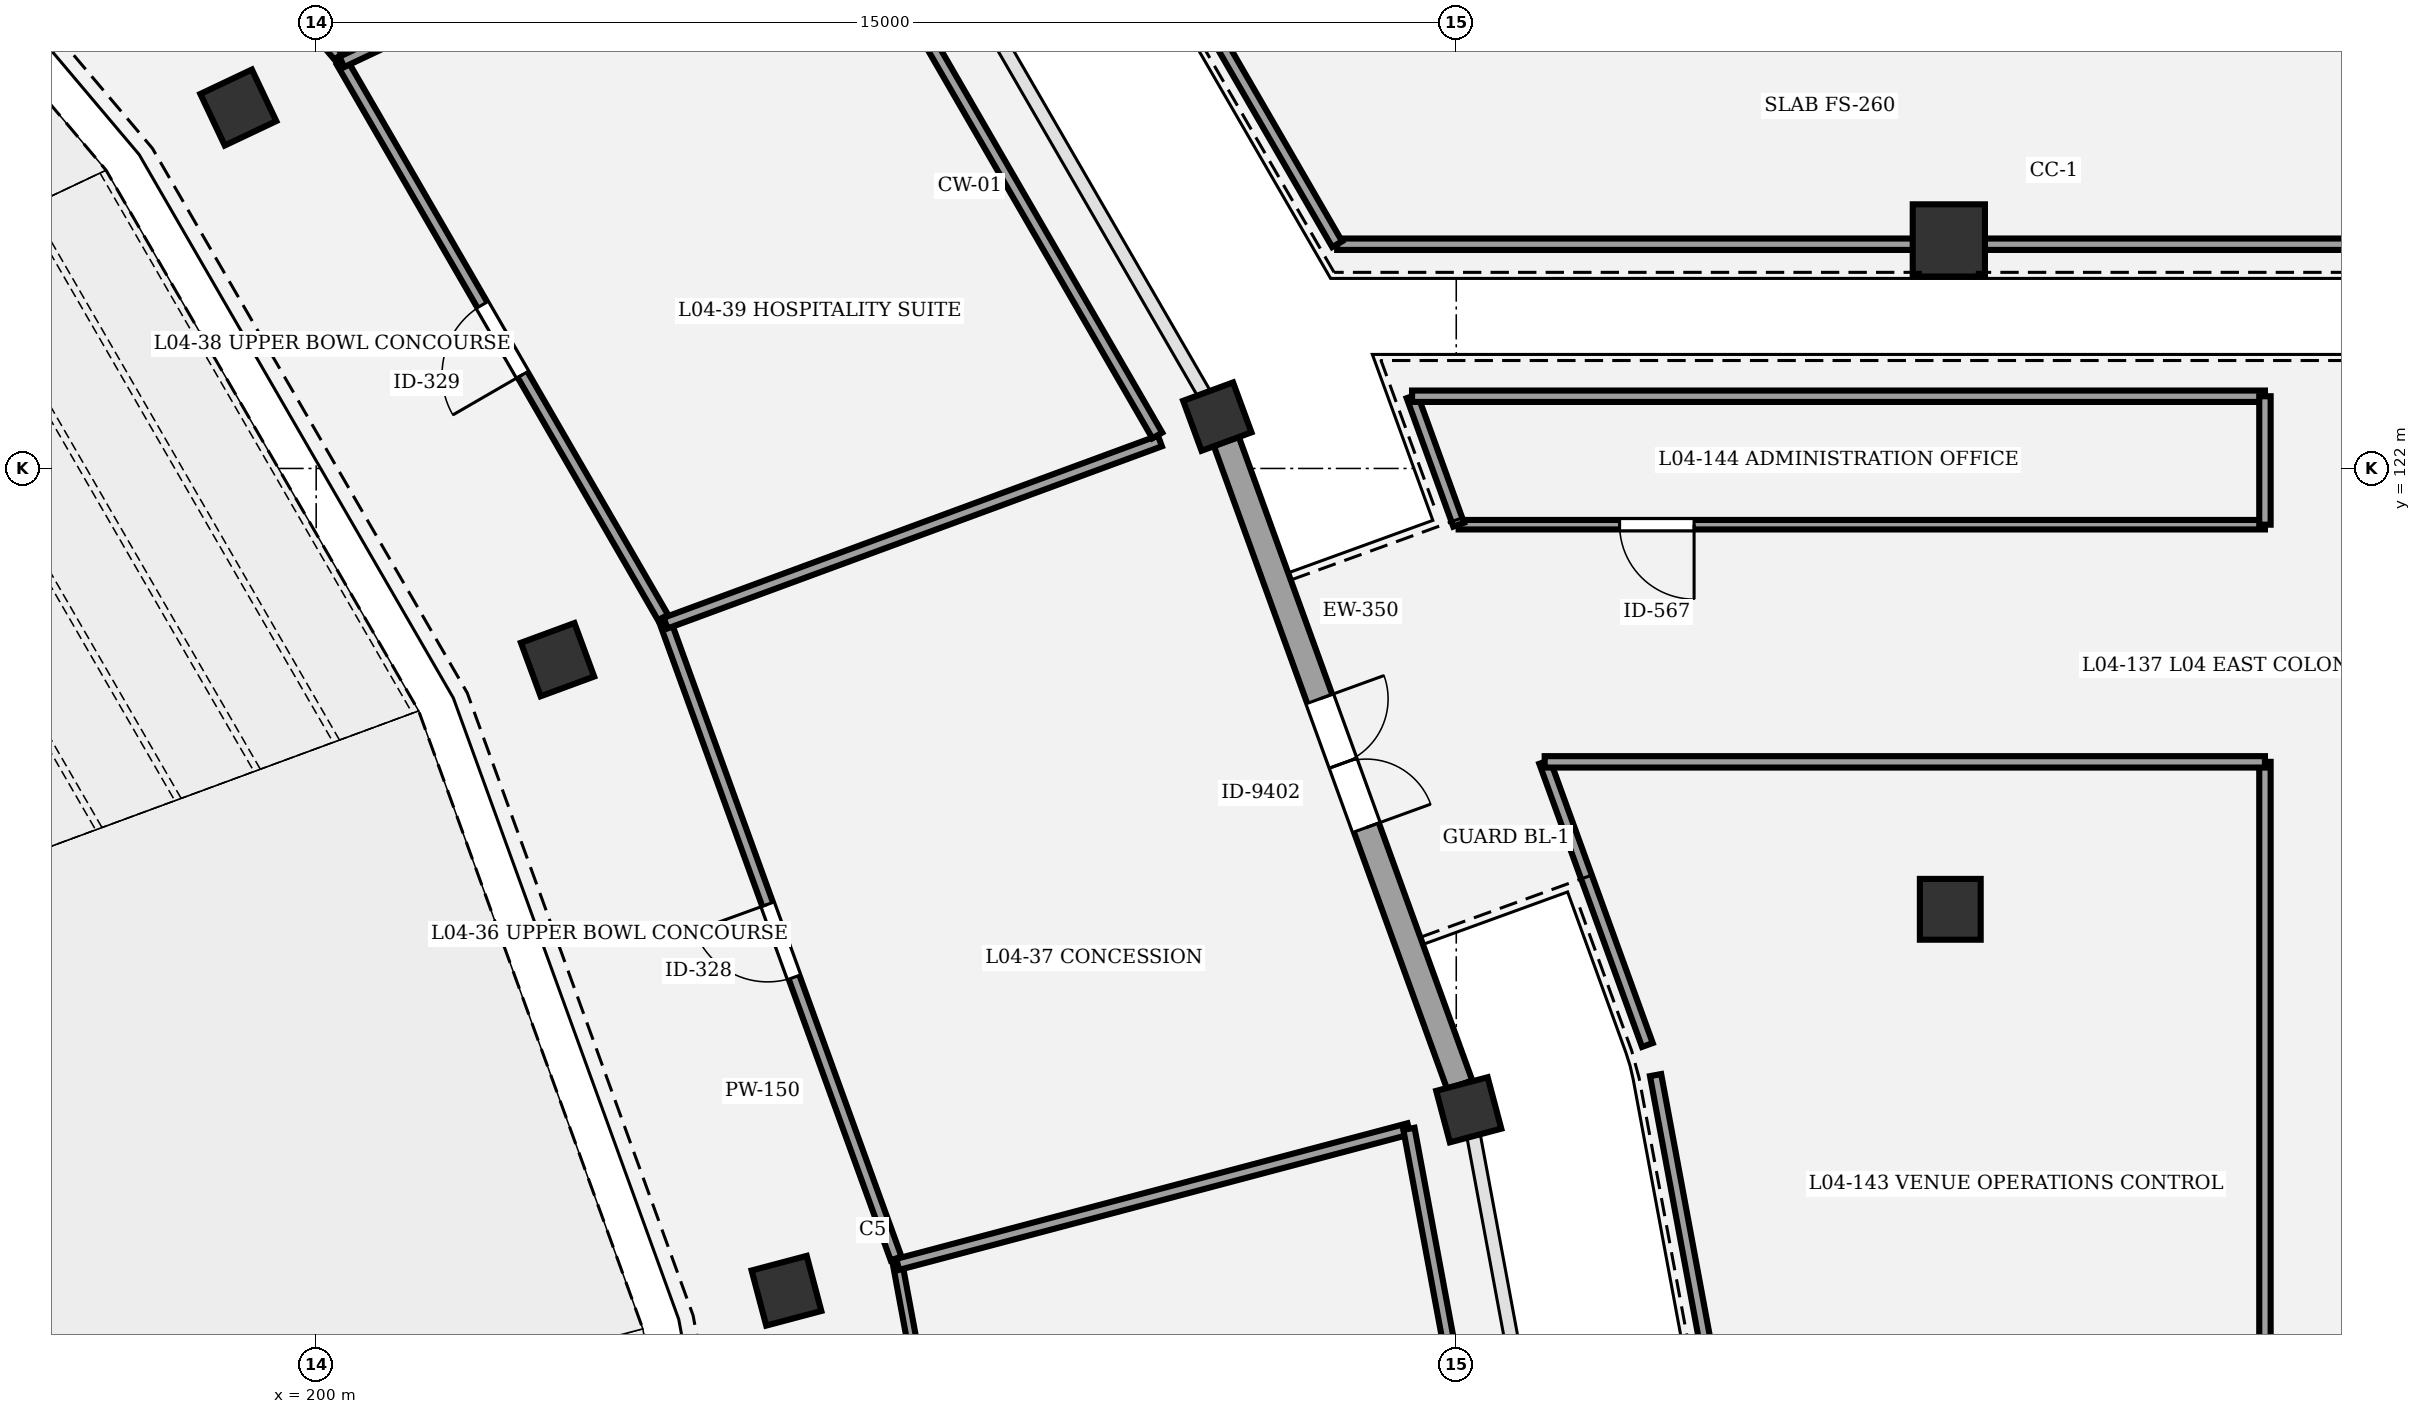
"""IFC4 building model, lengths in metres.
Left out: names, types, materials, properties, quantities, classifications, styles, units other than length and angle.
Written with IfcOpenShell. Run it as: python <this file> out.ifc"""

import sys

from ifc_helpers import new_model, si_unit, direction, frame, frame_2d, origin, origin_2d, place, context, subcontext, project, spatial, rectangle, circle, extrude, element, fill, save


model = new_model("IFC4")
c1 = context("Model", 3, precision=1e-05, world=origin(), true_north=direction((0.0, 1.0)))
c2 = subcontext(c1, "Body", "Model", "MODEL_VIEW")
j1 = project(units=[si_unit("LENGTHUNIT", "METRE"), si_unit("PLANEANGLEUNIT", "RADIAN")], contexts=[c1])
p1 = place(None, origin())
s1 = spatial("IfcSite", under=j1, at=p1, CompositionType="ELEMENT")
p2 = place(p1, origin())
s2 = spatial("IfcBuilding", under=s1, at=p2, CompositionType="ELEMENT")
p3 = place(p2, frame((0.0, 0.0, 19.2)))
s3 = spatial("IfcBuildingStorey", under=s2, at=p3, CompositionType="ELEMENT", Elevation=19.2)
p4 = place(p3, frame((206.188, 111.182, 0.0), z_axis=(0.0, 0.0, 1.0), x_axis=(0.966600102017, 0.256289373133, 0.0)))
e1 = element("IfcColumn", 1, at=p4, inside=s3, PredefinedType="COLUMN", context=c2, shape_type="SweptSolid", body=[
    extrude(rectangle(XDim=0.75, YDim=0.75, at=origin_2d()), origin(), (0.0, 0.0, 1.0), 4.8),
])
p5 = place(p3, frame((215.165, 113.562, 0.0), z_axis=(0.0, 0.0, 1.0), x_axis=(0.966600102017, 0.256289373133, 0.0)))
e2 = element("IfcColumn", 2, at=p5, inside=s3, PredefinedType="COLUMN", context=c2, shape_type="SweptSolid", body=[
    extrude(rectangle(XDim=0.7, YDim=0.7, at=origin_2d()), origin(), (0.0, 0.0, 1.0), 4.8),
])
p6 = place(p3, frame((203.176, 119.484, 0.0), z_axis=(0.0, 0.0, 1.0), x_axis=(0.938372433776, 0.34562577382, 0.0)))
e3 = element("IfcColumn", 3, at=p6, inside=s3, PredefinedType="COLUMN", context=c2, shape_type="SweptSolid", body=[
    extrude(rectangle(XDim=0.75, YDim=0.75, at=origin_2d()), origin(), (0.0, 0.0, 1.0), 4.8),
])
p7 = place(p3, frame((211.856, 122.682, 0.0), z_axis=(0.0, 0.0, 1.0), x_axis=(0.938372433776, 0.34562577382, 0.0)))
e4 = element("IfcColumn", 4, at=p7, inside=s3, PredefinedType="COLUMN", context=c2, shape_type="SweptSolid", body=[
    extrude(rectangle(XDim=0.7, YDim=0.7, at=origin_2d()), origin(), (0.0, 0.0, 1.0), 4.8),
])
p8 = place(p3, frame((198.976, 126.748, 0.0), z_axis=(0.0, 0.0, 1.0), x_axis=(0.903858661687, 0.4278311813, 0.0)))
e5 = element("IfcColumn", 5, at=p8, inside=s3, PredefinedType="COLUMN", context=c2, shape_type="SweptSolid", body=[
    extrude(rectangle(XDim=0.75, YDim=0.75, at=origin_2d()), origin(), (0.0, 0.0, 1.0), 4.8),
])
p9 = place(p3, frame((221.481, 125.0, 0.0), z_axis=(0.0, 0.0, 1.0), x_axis=(1.0, 0.0, 0.0)))
e6 = element("IfcColumn", 6, at=p9, inside=s3, PredefinedType="COLUMN", context=c2, shape_type="SweptSolid", body=[
    extrude(circle(Radius=0.475, at=origin_2d()), origin(), (0.0, 0.0, 1.0), 4.8),
])
p10 = place(p3, frame((221.5, 116.2, 0.0), z_axis=(0.0, 0.0, 1.0), x_axis=(1.0, 0.0, 0.0)))
e7 = element("IfcColumn", 7, at=p10, inside=s3, PredefinedType="COLUMN", context=c2, shape_type="SweptSolid", body=[
    extrude(circle(Radius=0.4, at=origin_2d()), origin(), (0.0, 0.0, 1.0), 4.8),
])
p11 = place(p3, frame((211.975, 122.355, 0.0), z_axis=(0.0, 0.0, 1.0), x_axis=(0.341022457694, -0.9400551491, 0.0)))
e8 = element("IfcWall", 8, at=p11, inside=s3, PredefinedType="STANDARD", context=c2, shape_type="SweptSolid", body=[
    extrude(rectangle(XDim=9.005, YDim=0.35, at=frame_2d((4.503, 0.0))), origin(), (0.0, 0.0, 1.0), 3.57),
])
p12 = place(p11, frame((3.603, 0.0, 0.0)))
e9 = element("IfcOpeningElement", 9, at=p12, cuts=e8, PredefinedType="OPENING", context=c2, shape_type="SweptSolid", body=[
    extrude(rectangle(XDim=1.8, YDim=2.4, at=frame_2d((0.9, 1.2))), frame((0.0, 0.185, 0.0), z_axis=(0.0, -1.0, 0.0), x_axis=(1.0, 0.0, 0.0)), (0.0, 0.0, 1.0), 0.37),
])
p13 = place(p3, frame((209.478, 101.695, 0.0), z_axis=(0.0, 0.0, 1.0), x_axis=(-0.18262590076, 0.983182475623, 0.0)))
e10 = element("IfcWall", 10, at=p13, inside=s3, PredefinedType="PARTITIONING", context=c2, shape_type="SweptSolid", body=[
    extrude(rectangle(XDim=10.002, YDim=0.125, at=frame_2d((5.001, 0.0))), origin(), (0.0, 0.0, 1.0), 3.55),
])
p14 = place(p13, frame((4.511, 0.0, 0.0)))
e11 = element("IfcOpeningElement", 11, at=p14, cuts=e10, PredefinedType="OPENING", context=c2, shape_type="SweptSolid", body=[
    extrude(rectangle(XDim=0.98, YDim=2.1, at=frame_2d((0.49, 1.05))), frame((0.0, 0.073, 0.0), z_axis=(0.0, -1.0, 0.0), x_axis=(1.0, 0.0, 0.0)), (0.0, 0.0, 1.0), 0.145),
])
p15 = place(p3, frame((207.63, 111.606, 0.0), z_axis=(0.0, 0.0, 1.0), x_axis=(-0.341024369151, 0.940054455681, 0.0)))
e12 = element("IfcWall", 12, at=p15, inside=s3, PredefinedType="PARTITIONING", context=c2, shape_type="SweptSolid", body=[
    extrude(rectangle(XDim=8.893, YDim=0.15, at=frame_2d((4.447, 0.0))), origin(), (0.0, 0.0, 1.0), 3.55),
])
p16 = place(p15, frame((3.936, 0.0, 0.0)))
e13 = element("IfcOpeningElement", 13, at=p16, cuts=e12, PredefinedType="OPENING", context=c2, shape_type="SweptSolid", body=[
    extrude(rectangle(XDim=1.02, YDim=2.1, at=frame_2d((0.51, 1.05))), frame((0.0, 0.085, 0.0), z_axis=(0.0, -1.0, 0.0), x_axis=(1.0, 0.0, 0.0)), (0.0, 0.0, 1.0), 0.17),
])
p17 = place(p3, frame((204.564, 120.039, 0.0), z_axis=(0.0, 0.0, 1.0), x_axis=(-0.500563217362, 0.865699985806, 0.0)))
e14 = element("IfcWall", 14, at=p17, inside=s3, PredefinedType="PARTITIONING", context=c2, shape_type="SweptSolid", body=[
    extrude(rectangle(XDim=8.444, YDim=0.15, at=frame_2d((4.222, 0.0))), origin(), (0.0, 0.0, 1.0), 3.55),
])
p18 = place(p17, frame((3.692, 0.0, 0.0)))
e15 = element("IfcOpeningElement", 15, at=p18, cuts=e14, PredefinedType="OPENING", context=c2, shape_type="SweptSolid", body=[
    extrude(rectangle(XDim=1.06, YDim=2.1, at=frame_2d((0.53, 1.05))), frame((0.0, 0.085, 0.0), z_axis=(0.0, -1.0, 0.0), x_axis=(1.0, 0.0, 0.0)), (0.0, 0.0, 1.0), 0.17),
])
p19 = place(p3, frame((200.292, 127.416, 0.0), z_axis=(0.0, 0.0, 1.0), x_axis=(-0.645175528474, 0.764034382379, 0.0)))
e16 = element("IfcWall", 16, at=p19, inside=s3, PredefinedType="PARTITIONING", context=c2, shape_type="SweptSolid", body=[
    extrude(rectangle(XDim=8.383, YDim=0.125, at=frame_2d((4.191, 0.0))), origin(), (0.0, 0.0, 1.0), 3.55),
])
p20 = place(p19, frame((3.641, 0.0, 0.0)))
e17 = element("IfcOpeningElement", 17, at=p20, cuts=e16, PredefinedType="OPENING", context=c2, shape_type="SweptSolid", body=[
    extrude(rectangle(XDim=1.1, YDim=2.1, at=frame_2d((0.55, 1.05))), frame((0.0, 0.073, 0.0), z_axis=(0.0, -1.0, 0.0), x_axis=(1.0, 0.0, 0.0)), (0.0, 0.0, 1.0), 0.145),
])
p21 = place(p3, frame((225.64, 118.14, 0.0), z_axis=(0.0, 0.0, 1.0), x_axis=(0.0, -1.0, 0.0)))
e18 = element("IfcWall", 18, at=p21, inside=s3, PredefinedType="PARTITIONING", context=c2, shape_type="SweptSolid", body=[
    extrude(rectangle(XDim=18.69, YDim=0.15, at=frame_2d((9.345, 0.0))), origin(), (0.0, 0.0, 1.0), 3.55),
])
p22 = place(p21, frame((11.441, 0.0, 0.0)))
e19 = element("IfcOpeningElement", 19, at=p22, cuts=e18, PredefinedType="OPENING", context=c2, shape_type="SweptSolid", body=[
    extrude(rectangle(XDim=0.94, YDim=2.3, at=frame_2d((0.47, 1.15))), frame((0.0, 0.085, 0.0), z_axis=(0.0, -1.0, 0.0), x_axis=(1.0, 0.0, 0.0)), (0.0, 0.0, 1.0), 0.17),
])
p23 = place(p3, frame((225.64, 121.26, 0.0), z_axis=(0.0, 0.0, 1.0), x_axis=(-1.0, 0.0, 0.0)))
e20 = element("IfcWall", 20, at=p23, inside=s3, PredefinedType="PARTITIONING", context=c2, shape_type="SweptSolid", body=[
    extrude(rectangle(XDim=10.608, YDim=0.125, at=frame_2d((5.304, 0.0))), origin(), (0.0, 0.0, 1.0), 3.55),
])
p24 = place(p23, frame((7.511, 0.0, 0.0)))
e21 = element("IfcOpeningElement", 21, at=p24, cuts=e20, PredefinedType="OPENING", context=c2, shape_type="SweptSolid", body=[
    extrude(rectangle(XDim=0.98, YDim=2.3, at=frame_2d((0.49, 1.15))), frame((0.0, 0.073, 0.0), z_axis=(0.0, -1.0, 0.0), x_axis=(1.0, 0.0, 0.0)), (0.0, 0.0, 1.0), 0.145),
])
p25 = place(p3, frame((207.651, 111.529, 0.0), z_axis=(0.0, 0.0, 1.0), x_axis=(0.966589237908, 0.256330343817, 0.0)))
e22 = element("IfcWall", 22, at=p25, inside=s3, PredefinedType="PARTITIONING", context=c2, shape_type="SweptSolid", body=[
    extrude(rectangle(XDim=6.958, YDim=0.15, at=frame_2d((3.479, 0.0))), origin(), (0.0, 0.0, 1.0), 3.55),
])
p26 = place(p3, frame((214.377, 113.312, 0.0), z_axis=(0.0, 0.0, 1.0), x_axis=(0.182612923346, -0.983184886086, 0.0)))
e23 = element("IfcWall", 23, at=p26, inside=s3, PredefinedType="PARTITIONING", context=c2, shape_type="SweptSolid", body=[
    extrude(rectangle(XDim=10.734, YDim=0.15, at=frame_2d((5.367, 0.0))), origin(), (0.0, 0.0, 1.0), 3.55),
])
p27 = place(p3, frame((204.597, 119.966, 0.0), z_axis=(0.0, 0.0, 1.0), x_axis=(0.938351535792, 0.345682506466, 0.0)))
e24 = element("IfcWall", 24, at=p27, inside=s3, PredefinedType="PARTITIONING", context=c2, shape_type="SweptSolid", body=[
    extrude(rectangle(XDim=6.931, YDim=0.15, at=frame_2d((3.466, 0.0))), origin(), (0.0, 0.0, 1.0), 3.55),
])
p28 = place(p3, frame((200.337, 127.349, 0.0), z_axis=(0.0, 0.0, 1.0), x_axis=(0.903854618659, 0.427839722709, 0.0)))
e25 = element("IfcWall", 25, at=p28, inside=s3, PredefinedType="PARTITIONING", context=c2, shape_type="SweptSolid", body=[
    extrude(rectangle(XDim=6.852, YDim=0.15, at=frame_2d((3.426, 0.0))), origin(), (0.0, 0.0, 1.0), 3.55),
])
p29 = place(p3, frame((206.53, 130.28, 0.0), z_axis=(0.0, 0.0, 1.0), x_axis=(0.500559416643, -0.865702183438, 0.0)))
e26 = element("IfcWall", 26, at=p29, inside=s3, PredefinedType="PARTITIONING", context=c2, shape_type="SweptSolid", body=[
    extrude(rectangle(XDim=9.063, YDim=0.15, at=frame_2d((4.531, 0.0))), origin(), (0.0, 0.0, 1.0), 3.55),
])
p30 = place(p3, frame((229.45, 124.95, 0.0), z_axis=(0.0, 0.0, 1.0), x_axis=(-1.0, 0.0, 0.0)))
e27 = element("IfcWall", 27, at=p30, inside=s3, PredefinedType="PARTITIONING", context=c2, shape_type="SweptSolid", body=[
    extrude(rectangle(XDim=16.017, YDim=0.15, at=frame_2d((8.009, 0.0))), origin(), (0.0, 0.0, 1.0), 3.55),
])
p31 = place(p3, frame((213.433, 124.95, 0.0), z_axis=(0.0, 0.0, 1.0), x_axis=(-0.500545605998, 0.865710168773, 0.0)))
e28 = element("IfcWall", 28, at=p31, inside=s3, PredefinedType="PARTITIONING", context=c2, shape_type="SweptSolid", body=[
    extrude(rectangle(XDim=8.043, YDim=0.15, at=frame_2d((4.021, 0.0))), origin(), (0.0, 0.0, 1.0), 3.55),
])
p32 = place(p3, frame((219.613, 103.302, 0.0), z_axis=(0.0, 0.0, 1.0), x_axis=(-0.182620957058, 0.983183393901, 0.0)))
e29 = element("IfcWall", 29, at=p32, inside=s3, PredefinedType="PARTITIONING", context=c2, shape_type="SweptSolid", body=[
    extrude(rectangle(XDim=10.901, YDim=0.15, at=frame_2d((5.45, 0.0))), origin(), (0.0, 0.0, 1.0), 3.55),
])
p33 = place(p3, frame((217.515, 114.415, 0.0), z_axis=(0.0, 0.0, 1.0), x_axis=(-0.341035525383, 0.94005040845, 0.0)))
e30 = element("IfcWall", 30, at=p33, inside=s3, PredefinedType="PARTITIONING", context=c2, shape_type="SweptSolid", body=[
    extrude(rectangle(XDim=3.962, YDim=0.15, at=frame_2d((1.981, 0.0))), origin(), (0.0, 0.0, 1.0), 3.55),
])
p34 = place(p3, frame((216.163, 118.14, 0.0), z_axis=(0.0, 0.0, 1.0), x_axis=(1.0, 0.0, 0.0)))
e31 = element("IfcWall", 31, at=p34, inside=s3, PredefinedType="PARTITIONING", context=c2, shape_type="SweptSolid", body=[
    extrude(rectangle(XDim=9.477, YDim=0.15, at=frame_2d((4.738, 0.0))), origin(), (0.0, 0.0, 1.0), 3.55),
])
p35 = place(p3, frame((215.031, 121.26, 0.0), z_axis=(0.0, 0.0, 1.0), x_axis=(-0.341012375502, 0.940058806541, 0.0)))
e32 = element("IfcWall", 32, at=p35, inside=s3, PredefinedType="PARTITIONING", context=c2, shape_type="SweptSolid", body=[
    extrude(rectangle(XDim=1.798, YDim=0.15, at=frame_2d((0.899, 0.0))), origin(), (0.0, 0.0, 1.0), 3.55),
])
p36 = place(p3, frame((214.418, 122.95, 0.0), z_axis=(0.0, 0.0, 1.0), x_axis=(1.0, 0.0, 0.0)))
e33 = element("IfcWall", 33, at=p36, inside=s3, PredefinedType="PARTITIONING", context=c2, shape_type="SweptSolid", body=[
    extrude(rectangle(XDim=11.221, YDim=0.15, at=frame_2d((5.611, 0.0))), origin(), (0.0, 0.0, 1.0), 3.55),
])
p37 = place(p3, frame((225.64, 122.95, 0.0), z_axis=(0.0, 0.0, 1.0), x_axis=(0.0, -1.0, 0.0)))
e34 = element("IfcWall", 34, at=p37, inside=s3, PredefinedType="PARTITIONING", context=c2, shape_type="SweptSolid", body=[
    extrude(rectangle(XDim=1.69, YDim=0.15, at=frame_2d((0.845, 0.0))), origin(), (0.0, 0.0, 1.0), 3.55),
])
p38 = place(p12, origin())
e35 = element("IfcDoor", 35, at=p38, inside=s3, OperationType="DOUBLE_DOOR_SINGLE_SWING", PredefinedType="DOOR", context=c2, shape_type="SweptSolid", body=[
    extrude(rectangle(XDim=1.8, YDim=2.4, at=frame_2d((0.9, 1.2))), frame((0.0, 0.025, 0.0), z_axis=(0.0, -1.0, 0.0), x_axis=(1.0, 0.0, 0.0)), (0.0, 0.0, 1.0), 0.05),
])
fill(e9, e35)
p39 = place(p16, origin())
e36 = element("IfcDoor", 36, at=p39, inside=s3, OperationType="SINGLE_SWING_RIGHT", PredefinedType="DOOR", context=c2, shape_type="SweptSolid", body=[
    extrude(rectangle(XDim=1.02, YDim=2.1, at=frame_2d((0.51, 1.05))), frame((0.0, 0.025, 0.0), z_axis=(0.0, -1.0, 0.0), x_axis=(1.0, 0.0, 0.0)), (0.0, 0.0, 1.0), 0.05),
])
fill(e13, e36)
p40 = place(p18, origin())
e37 = element("IfcDoor", 37, at=p40, inside=s3, OperationType="SINGLE_SWING_LEFT", PredefinedType="DOOR", context=c2, shape_type="SweptSolid", body=[
    extrude(rectangle(XDim=1.06, YDim=2.1, at=frame_2d((0.53, 1.05))), frame((0.0, 0.025, 0.0), z_axis=(0.0, -1.0, 0.0), x_axis=(1.0, 0.0, 0.0)), (0.0, 0.0, 1.0), 0.05),
])
fill(e15, e37)
p41 = place(p24, origin())
e38 = element("IfcDoor", 38, at=p41, inside=s3, OperationType="SINGLE_SWING_LEFT", PredefinedType="DOOR", context=c2, shape_type="SweptSolid", body=[
    extrude(rectangle(XDim=0.98, YDim=2.3, at=frame_2d((0.49, 1.15))), frame((0.0, 0.025, 0.0), z_axis=(0.0, -1.0, 0.0), x_axis=(1.0, 0.0, 0.0)), (0.0, 0.0, 1.0), 0.05),
])
fill(e21, e38)
save(model, sys.argv[1])
